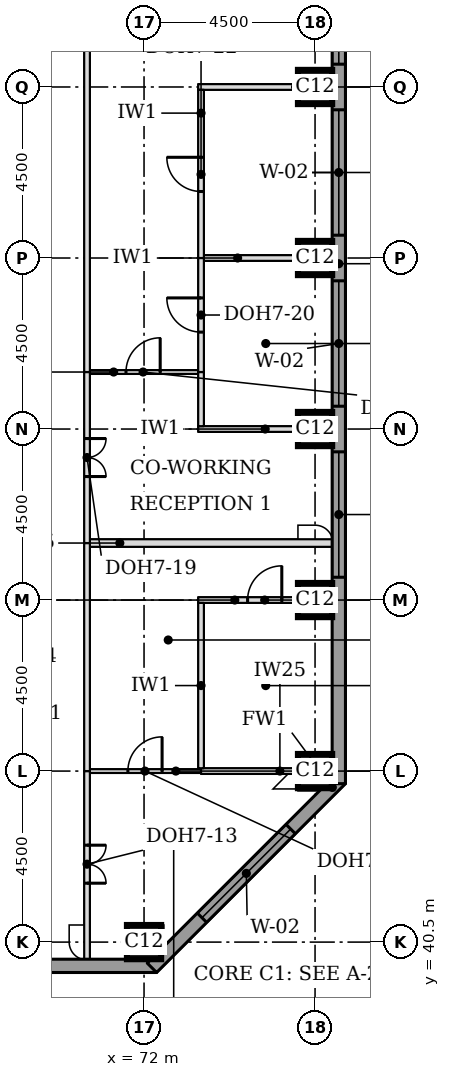
"""IFC4 building model, lengths in metres.
Left out: names, types, materials, properties, quantities, classifications, styles, units other than length and angle.
Written with IfcOpenShell. Run it as: python <this file> out.ifc"""

import sys

from ifc_helpers import new_model, si_unit, direction, frame, frame_2d, origin, origin_2d, place, context, subcontext, project, spatial, rectangle, extrude, element, fill, save


model = new_model("IFC4")
c1 = context("Model", 3, precision=1e-05, world=origin(), true_north=direction((0.0, 1.0)))
c2 = subcontext(c1, "Body", "Model", "MODEL_VIEW")
j1 = project(units=[si_unit("LENGTHUNIT", "METRE"), si_unit("PLANEANGLEUNIT", "RADIAN")], contexts=[c1])
p1 = place(None, origin())
s1 = spatial("IfcSite", under=j1, at=p1, CompositionType="ELEMENT")
p2 = place(p1, origin())
s2 = spatial("IfcBuilding", under=s1, at=p2, CompositionType="ELEMENT")
p3 = place(p2, frame((0.0, 0.0, 192.1)))
s3 = spatial("IfcBuildingStorey", under=s2, at=p3, CompositionType="ELEMENT", Elevation=192.1)
for number, where, z_axis, x_axis in (
    (1, (72.0, 40.5, 0.0), (0.0, 0.0, 1.0), (1.0, 0.0, 0.0)),
    (2, (76.5, 45.0, 0.0), (0.0, 0.0, 1.0), (1.0, 0.0, 0.0)),
    (3, (76.5, 49.5, 0.0), (0.0, 0.0, 1.0), (1.0, 0.0, 0.0)),
    (4, (76.5, 54.0, 0.0), (0.0, 0.0, 1.0), (1.0, 0.0, 0.0)),
    (5, (76.5, 58.5, 0.0), (0.0, 0.0, 1.0), (1.0, 0.0, 0.0)),
    (6, (76.5, 63.0, 0.0), (0.0, 0.0, 1.0), (1.0, 0.0, 0.0)),
):
    element("IfcColumn", number, at=place(p3, frame(where, z_axis=z_axis, x_axis=x_axis)), inside=s3, PredefinedType="COLUMN", context=c2, shape_type="SweptSolid", body=[
        extrude(rectangle(XDim=0.9, YDim=0.9, at=origin_2d()), origin(), (0.0, 0.0, 1.0), 3.7),
    ])
p4 = place(p3, frame((36.0, 39.875, 0.0), z_axis=(0.0, 0.0, 1.0), x_axis=(1.0, 0.0, 0.0)))
e7 = element("IfcWall", 7, at=p4, inside=s3, PredefinedType="STANDARD", context=c2, shape_type="SweptSolid", body=[
    extrude(rectangle(XDim=36.331, YDim=0.35, at=frame_2d((18.166, 0.0))), origin(), (0.0, 0.0, 1.0), 3.525),
])
p5 = place(p4, frame((5.1, 0.0, 0.9)))
e8 = element("IfcOpeningElement", 8, at=p5, cuts=e7, PredefinedType="OPENING", context=c2, shape_type="SweptSolid", body=[
    extrude(rectangle(XDim=3.3, YDim=1.9, at=frame_2d((1.65, 0.95))), frame((0.0, 0.185, 0.0), z_axis=(0.0, -1.0, 0.0), x_axis=(1.0, 0.0, 0.0)), (0.0, 0.0, 1.0), 0.37),
])
p6 = place(p4, frame((9.6, 0.0, 0.9)))
e9 = element("IfcOpeningElement", 9, at=p6, cuts=e7, PredefinedType="OPENING", context=c2, shape_type="SweptSolid", body=[
    extrude(rectangle(XDim=3.3, YDim=1.9, at=frame_2d((1.65, 0.95))), frame((0.0, 0.185, 0.0), z_axis=(0.0, -1.0, 0.0), x_axis=(1.0, 0.0, 0.0)), (0.0, 0.0, 1.0), 0.37),
])
p7 = place(p4, frame((14.1, 0.0, 0.9)))
e10 = element("IfcOpeningElement", 10, at=p7, cuts=e7, PredefinedType="OPENING", context=c2, shape_type="SweptSolid", body=[
    extrude(rectangle(XDim=3.3, YDim=1.9, at=frame_2d((1.65, 0.95))), frame((0.0, 0.185, 0.0), z_axis=(0.0, -1.0, 0.0), x_axis=(1.0, 0.0, 0.0)), (0.0, 0.0, 1.0), 0.37),
])
p8 = place(p4, frame((18.6, 0.0, 0.9)))
e11 = element("IfcOpeningElement", 11, at=p8, cuts=e7, PredefinedType="OPENING", context=c2, shape_type="SweptSolid", body=[
    extrude(rectangle(XDim=3.3, YDim=1.9, at=frame_2d((1.65, 0.95))), frame((0.0, 0.185, 0.0), z_axis=(0.0, -1.0, 0.0), x_axis=(1.0, 0.0, 0.0)), (0.0, 0.0, 1.0), 0.37),
])
p9 = place(p4, frame((23.1, 0.0, 0.9)))
e12 = element("IfcOpeningElement", 12, at=p9, cuts=e7, PredefinedType="OPENING", context=c2, shape_type="SweptSolid", body=[
    extrude(rectangle(XDim=3.3, YDim=1.9, at=frame_2d((1.65, 0.95))), frame((0.0, 0.185, 0.0), z_axis=(0.0, -1.0, 0.0), x_axis=(1.0, 0.0, 0.0)), (0.0, 0.0, 1.0), 0.37),
])
p10 = place(p4, frame((27.6, 0.0, 0.9)))
e13 = element("IfcOpeningElement", 13, at=p10, cuts=e7, PredefinedType="OPENING", context=c2, shape_type="SweptSolid", body=[
    extrude(rectangle(XDim=3.3, YDim=1.9, at=frame_2d((1.65, 0.95))), frame((0.0, 0.185, 0.0), z_axis=(0.0, -1.0, 0.0), x_axis=(1.0, 0.0, 0.0)), (0.0, 0.0, 1.0), 0.37),
])
p11 = place(p3, frame((72.208, 39.824, 0.0), z_axis=(0.0, 0.0, 1.0), x_axis=(0.707106781187, 0.707106781187, 0.0)))
e14 = element("IfcWall", 14, at=p11, inside=s3, PredefinedType="STANDARD", context=c2, shape_type="SweptSolid", body=[
    extrude(rectangle(XDim=7.027, YDim=0.35, at=frame_2d((3.513, 0.0))), origin(), (0.0, 0.0, 1.0), 3.525),
])
p12 = place(p11, frame((1.863, 0.0, 0.9)))
e15 = element("IfcOpeningElement", 15, at=p12, cuts=e14, PredefinedType="OPENING", context=c2, shape_type="SweptSolid", body=[
    extrude(rectangle(XDim=3.3, YDim=1.9, at=frame_2d((1.65, 0.95))), frame((0.0, 0.185, 0.0), z_axis=(0.0, -1.0, 0.0), x_axis=(1.0, 0.0, 0.0)), (0.0, 0.0, 1.0), 0.37),
])
p13 = place(p3, frame((77.125, 44.669, 0.0), z_axis=(0.0, 0.0, 1.0), x_axis=(0.0, 1.0, 0.0)))
e16 = element("IfcWall", 16, at=p13, inside=s3, PredefinedType="STANDARD", context=c2, shape_type="SweptSolid", body=[
    extrude(rectangle(XDim=32.163, YDim=0.35, at=frame_2d((16.081, 0.0))), origin(), (0.0, 0.0, 1.0), 3.525),
])
p14 = place(p13, frame((5.431, 0.0, 0.9)))
e17 = element("IfcOpeningElement", 17, at=p14, cuts=e16, PredefinedType="OPENING", context=c2, shape_type="SweptSolid", body=[
    extrude(rectangle(XDim=3.3, YDim=1.9, at=frame_2d((1.65, 0.95))), frame((0.0, 0.185, 0.0), z_axis=(0.0, -1.0, 0.0), x_axis=(1.0, 0.0, 0.0)), (0.0, 0.0, 1.0), 0.37),
])
p15 = place(p13, frame((9.931, 0.0, 0.9)))
e18 = element("IfcOpeningElement", 18, at=p15, cuts=e16, PredefinedType="OPENING", context=c2, shape_type="SweptSolid", body=[
    extrude(rectangle(XDim=3.3, YDim=1.9, at=frame_2d((1.65, 0.95))), frame((0.0, 0.185, 0.0), z_axis=(0.0, -1.0, 0.0), x_axis=(1.0, 0.0, 0.0)), (0.0, 0.0, 1.0), 0.37),
])
p16 = place(p13, frame((14.431, 0.0, 0.9)))
e19 = element("IfcOpeningElement", 19, at=p16, cuts=e16, PredefinedType="OPENING", context=c2, shape_type="SweptSolid", body=[
    extrude(rectangle(XDim=3.3, YDim=1.9, at=frame_2d((1.65, 0.95))), frame((0.0, 0.185, 0.0), z_axis=(0.0, -1.0, 0.0), x_axis=(1.0, 0.0, 0.0)), (0.0, 0.0, 1.0), 0.37),
])
p17 = place(p13, frame((18.931, 0.0, 0.9)))
e20 = element("IfcOpeningElement", 20, at=p17, cuts=e16, PredefinedType="OPENING", context=c2, shape_type="SweptSolid", body=[
    extrude(rectangle(XDim=3.3, YDim=1.9, at=frame_2d((1.65, 0.95))), frame((0.0, 0.185, 0.0), z_axis=(0.0, -1.0, 0.0), x_axis=(1.0, 0.0, 0.0)), (0.0, 0.0, 1.0), 0.37),
])
p18 = place(p13, frame((23.431, 0.0, 0.9)))
e21 = element("IfcOpeningElement", 21, at=p18, cuts=e16, PredefinedType="OPENING", context=c2, shape_type="SweptSolid", body=[
    extrude(rectangle(XDim=3.3, YDim=1.9, at=frame_2d((1.65, 0.95))), frame((0.0, 0.185, 0.0), z_axis=(0.0, -1.0, 0.0), x_axis=(1.0, 0.0, 0.0)), (0.0, 0.0, 1.0), 0.37),
])
p19 = place(p3, frame((70.575, 45.0, 0.0), z_axis=(0.0, 0.0, 1.0), x_axis=(1.0, 0.0, 0.0)))
e22 = element("IfcWall", 22, at=p19, inside=s3, PredefinedType="PARTITIONING", context=c2, shape_type="SweptSolid", body=[
    extrude(rectangle(XDim=2.925, YDim=0.1, at=frame_2d((1.462, 0.0))), origin(), (0.0, 0.0, 1.0), 3.096),
])
p20 = place(p19, frame((1.0, 0.0, 0.0)))
e23 = element("IfcOpeningElement", 23, at=p20, cuts=e22, PredefinedType="OPENING", context=c2, shape_type="SweptSolid", body=[
    extrude(rectangle(XDim=0.9, YDim=2.1, at=frame_2d((0.45, 1.05))), frame((0.0, 0.06, 0.0), z_axis=(0.0, -1.0, 0.0), x_axis=(1.0, 0.0, 0.0)), (0.0, 0.0, 1.0), 0.12),
])
p21 = place(p3, frame((73.5, 45.0, 0.0), z_axis=(0.0, 0.0, 1.0), x_axis=(1.0, 0.0, 0.0)))
e24 = element("IfcWall", 24, at=p21, inside=s3, PredefinedType="PARTITIONING", context=c2, shape_type="SweptSolid", body=[
    extrude(rectangle(XDim=2.55, YDim=0.15, at=frame_2d((1.275, 0.0))), origin(), (0.0, 0.0, 1.0), 3.096),
])
p22 = place(p3, frame((73.425, 49.5, 0.0), z_axis=(0.0, 0.0, 1.0), x_axis=(1.0, 0.0, 0.0)))
e25 = element("IfcWall", 25, at=p22, inside=s3, PredefinedType="PARTITIONING", context=c2, shape_type="SweptSolid", body=[
    extrude(rectangle(XDim=3.525, YDim=0.15, at=frame_2d((1.762, 0.0))), origin(), (0.0, 0.0, 1.0), 3.55),
])
p23 = place(p22, frame((1.3, 0.0, 0.0)))
e26 = element("IfcOpeningElement", 26, at=p23, cuts=e25, PredefinedType="OPENING", context=c2, shape_type="SweptSolid", body=[
    extrude(rectangle(XDim=0.9, YDim=2.1, at=frame_2d((0.45, 1.05))), frame((0.0, 0.085, 0.0), z_axis=(0.0, -1.0, 0.0), x_axis=(1.0, 0.0, 0.0)), (0.0, 0.0, 1.0), 0.17),
])
p24 = place(p3, frame((70.575, 51.0, 0.0), z_axis=(0.0, 0.0, 1.0), x_axis=(1.0, 0.0, 0.0)))
e27 = element("IfcWall", 27, at=p24, inside=s3, PredefinedType="PARTITIONING", context=c2, shape_type="SweptSolid", body=[
    extrude(rectangle(XDim=6.375, YDim=0.2, at=frame_2d((3.188, 0.0))), origin(), (0.0, 0.0, 1.0), 3.55),
])
p25 = place(p3, frame((73.425, 54.0, 0.0), z_axis=(0.0, 0.0, 1.0), x_axis=(1.0, 0.0, 0.0)))
e28 = element("IfcWall", 28, at=p25, inside=s3, PredefinedType="PARTITIONING", context=c2, shape_type="SweptSolid", body=[
    extrude(rectangle(XDim=3.525, YDim=0.15, at=frame_2d((1.762, 0.0))), origin(), (0.0, 0.0, 1.0), 3.55),
])
p26 = place(p3, frame((70.575, 55.5, 0.0), z_axis=(0.0, 0.0, 1.0), x_axis=(1.0, 0.0, 0.0)))
e29 = element("IfcWall", 29, at=p26, inside=s3, PredefinedType="PARTITIONING", context=c2, shape_type="SweptSolid", body=[
    extrude(rectangle(XDim=2.85, YDim=0.1, at=frame_2d((1.425, 0.0))), origin(), (0.0, 0.0, 1.0), 3.55),
])
p27 = place(p26, frame((0.95, 0.0, 0.0)))
e30 = element("IfcOpeningElement", 30, at=p27, cuts=e29, PredefinedType="OPENING", context=c2, shape_type="SweptSolid", body=[
    extrude(rectangle(XDim=0.9, YDim=2.1, at=frame_2d((0.45, 1.05))), frame((0.0, 0.06, 0.0), z_axis=(0.0, -1.0, 0.0), x_axis=(1.0, 0.0, 0.0)), (0.0, 0.0, 1.0), 0.12),
])
p28 = place(p3, frame((73.575, 58.5, 0.0), z_axis=(0.0, 0.0, 1.0), x_axis=(1.0, 0.0, 0.0)))
e31 = element("IfcWall", 31, at=p28, inside=s3, PredefinedType="PARTITIONING", context=c2, shape_type="SweptSolid", body=[
    extrude(rectangle(XDim=3.375, YDim=0.15, at=frame_2d((1.688, 0.0))), origin(), (0.0, 0.0, 1.0), 3.55),
])
p29 = place(p3, frame((73.425, 63.0, 0.0), z_axis=(0.0, 0.0, 1.0), x_axis=(1.0, 0.0, 0.0)))
e32 = element("IfcWall", 32, at=p29, inside=s3, PredefinedType="PARTITIONING", context=c2, shape_type="SweptSolid", body=[
    extrude(rectangle(XDim=3.525, YDim=0.15, at=frame_2d((1.762, 0.0))), origin(), (0.0, 0.0, 1.0), 3.55),
])
p30 = place(p3, frame((70.5, 40.05, 0.0), z_axis=(0.0, 0.0, 1.0), x_axis=(0.0, 1.0, 0.0)))
e33 = element("IfcWall", 33, at=p30, inside=s3, PredefinedType="PARTITIONING", context=c2, shape_type="SweptSolid", body=[
    extrude(rectangle(XDim=4.95, YDim=0.15, at=frame_2d((2.475, 0.0))), origin(), (0.0, 0.0, 1.0), 3.55),
])
p31 = place(p30, frame((2.0, 0.0, 0.0)))
e34 = element("IfcOpeningElement", 34, at=p31, cuts=e33, PredefinedType="OPENING", context=c2, shape_type="SweptSolid", body=[
    extrude(rectangle(XDim=1.0, YDim=2.1, at=frame_2d((0.5, 1.05))), frame((0.0, 0.085, 0.0), z_axis=(0.0, -1.0, 0.0), x_axis=(1.0, 0.0, 0.0)), (0.0, 0.0, 1.0), 0.17),
])
p32 = place(p3, frame((70.5, 45.0, 0.0), z_axis=(0.0, 0.0, 1.0), x_axis=(0.0, 1.0, 0.0)))
e35 = element("IfcWall", 35, at=p32, inside=s3, PredefinedType="PARTITIONING", context=c2, shape_type="SweptSolid", body=[
    extrude(rectangle(XDim=6.0, YDim=0.15, at=frame_2d((3.0, 0.0))), origin(), (0.0, 0.0, 1.0), 3.55),
])
p33 = place(p3, frame((73.5, 45.075, 0.0), z_axis=(0.0, 0.0, 1.0), x_axis=(0.0, 1.0, 0.0)))
e36 = element("IfcWall", 36, at=p33, inside=s3, PredefinedType="PARTITIONING", context=c2, shape_type="SweptSolid", body=[
    extrude(rectangle(XDim=4.35, YDim=0.15, at=frame_2d((2.175, 0.0))), origin(), (0.0, 0.0, 1.0), 3.55),
])
p34 = place(p3, frame((70.5, 51.0, 0.0), z_axis=(0.0, 0.0, 1.0), x_axis=(0.0, 1.0, 0.0)))
e37 = element("IfcWall", 37, at=p34, inside=s3, PredefinedType="PARTITIONING", context=c2, shape_type="SweptSolid", body=[
    extrude(rectangle(XDim=4.5, YDim=0.15, at=frame_2d((2.25, 0.0))), origin(), (0.0, 0.0, 1.0), 3.55),
])
p35 = place(p34, frame((1.75, 0.0, 0.0)))
e38 = element("IfcOpeningElement", 38, at=p35, cuts=e37, PredefinedType="OPENING", context=c2, shape_type="SweptSolid", body=[
    extrude(rectangle(XDim=1.0, YDim=2.1, at=frame_2d((0.5, 1.05))), frame((0.0, 0.085, 0.0), z_axis=(0.0, -1.0, 0.0), x_axis=(1.0, 0.0, 0.0)), (0.0, 0.0, 1.0), 0.17),
])
p36 = place(p3, frame((73.5, 54.075, 0.0), z_axis=(0.0, 0.0, 1.0), x_axis=(0.0, 1.0, 0.0)))
e39 = element("IfcWall", 39, at=p36, inside=s3, PredefinedType="PARTITIONING", context=c2, shape_type="SweptSolid", body=[
    extrude(rectangle(XDim=1.425, YDim=0.15, at=frame_2d((0.712, 0.0))), origin(), (0.0, 0.0, 1.0), 3.55),
])
p37 = place(p3, frame((70.5, 55.5, 0.0), z_axis=(0.0, 0.0, 1.0), x_axis=(0.0, 1.0, 0.0)))
e40 = element("IfcWall", 40, at=p37, inside=s3, PredefinedType="PARTITIONING", context=c2, shape_type="SweptSolid", body=[
    extrude(rectangle(XDim=22.5, YDim=0.15, at=frame_2d((11.25, 0.0))), origin(), (0.0, 0.0, 1.0), 3.55),
])
p38 = place(p3, frame((73.5, 55.5, 0.0), z_axis=(0.0, 0.0, 1.0), x_axis=(0.0, 1.0, 0.0)))
e41 = element("IfcWall", 41, at=p38, inside=s3, PredefinedType="PARTITIONING", context=c2, shape_type="SweptSolid", body=[
    extrude(rectangle(XDim=3.0, YDim=0.15, at=frame_2d((1.5, 0.0))), origin(), (0.0, 0.0, 1.0), 3.55),
])
p39 = place(p38, frame((1.05, 0.0, 0.0)))
e42 = element("IfcOpeningElement", 42, at=p39, cuts=e41, PredefinedType="OPENING", context=c2, shape_type="SweptSolid", body=[
    extrude(rectangle(XDim=0.9, YDim=2.1, at=frame_2d((0.45, 1.05))), frame((0.0, 0.085, 0.0), z_axis=(0.0, -1.0, 0.0), x_axis=(1.0, 0.0, 0.0)), (0.0, 0.0, 1.0), 0.17),
])
p40 = place(p3, frame((73.5, 58.5, 0.0), z_axis=(0.0, 0.0, 1.0), x_axis=(0.0, 1.0, 0.0)))
e43 = element("IfcWall", 43, at=p40, inside=s3, PredefinedType="PARTITIONING", context=c2, shape_type="SweptSolid", body=[
    extrude(rectangle(XDim=4.425, YDim=0.15, at=frame_2d((2.212, 0.0))), origin(), (0.0, 0.0, 1.0), 3.55),
])
p41 = place(p40, frame((1.75, 0.0, 0.0)))
e44 = element("IfcOpeningElement", 44, at=p41, cuts=e43, PredefinedType="OPENING", context=c2, shape_type="SweptSolid", body=[
    extrude(rectangle(XDim=0.9, YDim=2.1, at=frame_2d((0.45, 1.05))), frame((0.0, 0.085, 0.0), z_axis=(0.0, -1.0, 0.0), x_axis=(1.0, 0.0, 0.0)), (0.0, 0.0, 1.0), 0.17),
])
p42 = place(p12, origin())
e45 = element("IfcWindow", 45, at=p42, inside=s3, PartitioningType="SINGLE_PANEL", PredefinedType="WINDOW", context=c2, shape_type="SweptSolid", body=[
    extrude(rectangle(XDim=3.3, YDim=1.9, at=frame_2d((1.65, 0.95))), frame((0.0, 0.085, 0.0), z_axis=(0.0, -1.0, 0.0), x_axis=(1.0, 0.0, 0.0)), (0.0, 0.0, 1.0), 0.06),
])
fill(e15, e45)
p43 = place(p14, origin())
e46 = element("IfcWindow", 46, at=p43, inside=s3, PartitioningType="SINGLE_PANEL", PredefinedType="WINDOW", context=c2, shape_type="SweptSolid", body=[
    extrude(rectangle(XDim=3.3, YDim=1.9, at=frame_2d((1.65, 0.95))), frame((0.0, 0.085, 0.0), z_axis=(0.0, -1.0, 0.0), x_axis=(1.0, 0.0, 0.0)), (0.0, 0.0, 1.0), 0.06),
])
fill(e17, e46)
p44 = place(p15, origin())
e47 = element("IfcWindow", 47, at=p44, inside=s3, PartitioningType="SINGLE_PANEL", PredefinedType="WINDOW", context=c2, shape_type="SweptSolid", body=[
    extrude(rectangle(XDim=3.3, YDim=1.9, at=frame_2d((1.65, 0.95))), frame((0.0, 0.085, 0.0), z_axis=(0.0, -1.0, 0.0), x_axis=(1.0, 0.0, 0.0)), (0.0, 0.0, 1.0), 0.06),
])
fill(e18, e47)
p45 = place(p16, origin())
e48 = element("IfcWindow", 48, at=p45, inside=s3, PartitioningType="SINGLE_PANEL", PredefinedType="WINDOW", context=c2, shape_type="SweptSolid", body=[
    extrude(rectangle(XDim=3.3, YDim=1.9, at=frame_2d((1.65, 0.95))), frame((0.0, 0.085, 0.0), z_axis=(0.0, -1.0, 0.0), x_axis=(1.0, 0.0, 0.0)), (0.0, 0.0, 1.0), 0.06),
])
fill(e19, e48)
p46 = place(p17, origin())
e49 = element("IfcWindow", 49, at=p46, inside=s3, PartitioningType="SINGLE_PANEL", PredefinedType="WINDOW", context=c2, shape_type="SweptSolid", body=[
    extrude(rectangle(XDim=3.3, YDim=1.9, at=frame_2d((1.65, 0.95))), frame((0.0, 0.085, 0.0), z_axis=(0.0, -1.0, 0.0), x_axis=(1.0, 0.0, 0.0)), (0.0, 0.0, 1.0), 0.06),
])
fill(e20, e49)
p47 = place(p31, frame((1.0, 0.0, 0.0), z_axis=(0.0, 0.0, 1.0), x_axis=(-1.0, 0.0, 0.0)))
e50 = element("IfcDoor", 50, at=p47, inside=s3, OperationType="DOUBLE_DOOR_SINGLE_SWING", PredefinedType="DOOR", context=c2, shape_type="SweptSolid", body=[
    extrude(rectangle(XDim=1.0, YDim=2.1, at=frame_2d((0.5, 1.05))), frame((0.0, 0.025, 0.0), z_axis=(0.0, -1.0, 0.0), x_axis=(1.0, 0.0, 0.0)), (0.0, 0.0, 1.0), 0.05),
])
fill(e34, e50)
p48 = place(p20, origin())
e51 = element("IfcDoor", 51, at=p48, inside=s3, OperationType="SINGLE_SWING_RIGHT", PredefinedType="DOOR", context=c2, shape_type="SweptSolid", body=[
    extrude(rectangle(XDim=0.9, YDim=2.1, at=frame_2d((0.45, 1.05))), frame((0.0, 0.025, 0.0), z_axis=(0.0, -1.0, 0.0), x_axis=(1.0, 0.0, 0.0)), (0.0, 0.0, 1.0), 0.05),
])
fill(e23, e51)
p49 = place(p23, origin())
e52 = element("IfcDoor", 52, at=p49, inside=s3, OperationType="SINGLE_SWING_RIGHT", PredefinedType="DOOR", context=c2, shape_type="SweptSolid", body=[
    extrude(rectangle(XDim=0.9, YDim=2.1, at=frame_2d((0.45, 1.05))), frame((0.0, 0.025, 0.0), z_axis=(0.0, -1.0, 0.0), x_axis=(1.0, 0.0, 0.0)), (0.0, 0.0, 1.0), 0.05),
])
fill(e26, e52)
p50 = place(p35, frame((1.0, 0.0, 0.0), z_axis=(0.0, 0.0, 1.0), x_axis=(-1.0, 0.0, 0.0)))
e53 = element("IfcDoor", 53, at=p50, inside=s3, OperationType="DOUBLE_DOOR_SINGLE_SWING", PredefinedType="DOOR", context=c2, shape_type="SweptSolid", body=[
    extrude(rectangle(XDim=1.0, YDim=2.1, at=frame_2d((0.5, 1.05))), frame((0.0, 0.025, 0.0), z_axis=(0.0, -1.0, 0.0), x_axis=(1.0, 0.0, 0.0)), (0.0, 0.0, 1.0), 0.05),
])
fill(e38, e53)
p51 = place(p27, origin())
e54 = element("IfcDoor", 54, at=p51, inside=s3, OperationType="SINGLE_SWING_RIGHT", PredefinedType="DOOR", context=c2, shape_type="SweptSolid", body=[
    extrude(rectangle(XDim=0.9, YDim=2.1, at=frame_2d((0.45, 1.05))), frame((0.0, 0.025, 0.0), z_axis=(0.0, -1.0, 0.0), x_axis=(1.0, 0.0, 0.0)), (0.0, 0.0, 1.0), 0.05),
])
fill(e30, e54)
p52 = place(p39, origin())
e55 = element("IfcDoor", 55, at=p52, inside=s3, OperationType="SINGLE_SWING_RIGHT", PredefinedType="DOOR", context=c2, shape_type="SweptSolid", body=[
    extrude(rectangle(XDim=0.9, YDim=2.1, at=frame_2d((0.45, 1.05))), frame((0.0, 0.025, 0.0), z_axis=(0.0, -1.0, 0.0), x_axis=(1.0, 0.0, 0.0)), (0.0, 0.0, 1.0), 0.05),
])
fill(e42, e55)
p53 = place(p41, origin())
e56 = element("IfcDoor", 56, at=p53, inside=s3, OperationType="SINGLE_SWING_RIGHT", PredefinedType="DOOR", context=c2, shape_type="SweptSolid", body=[
    extrude(rectangle(XDim=0.9, YDim=2.1, at=frame_2d((0.45, 1.05))), frame((0.0, 0.025, 0.0), z_axis=(0.0, -1.0, 0.0), x_axis=(1.0, 0.0, 0.0)), (0.0, 0.0, 1.0), 0.05),
])
fill(e44, e56)
save(model, sys.argv[1])
